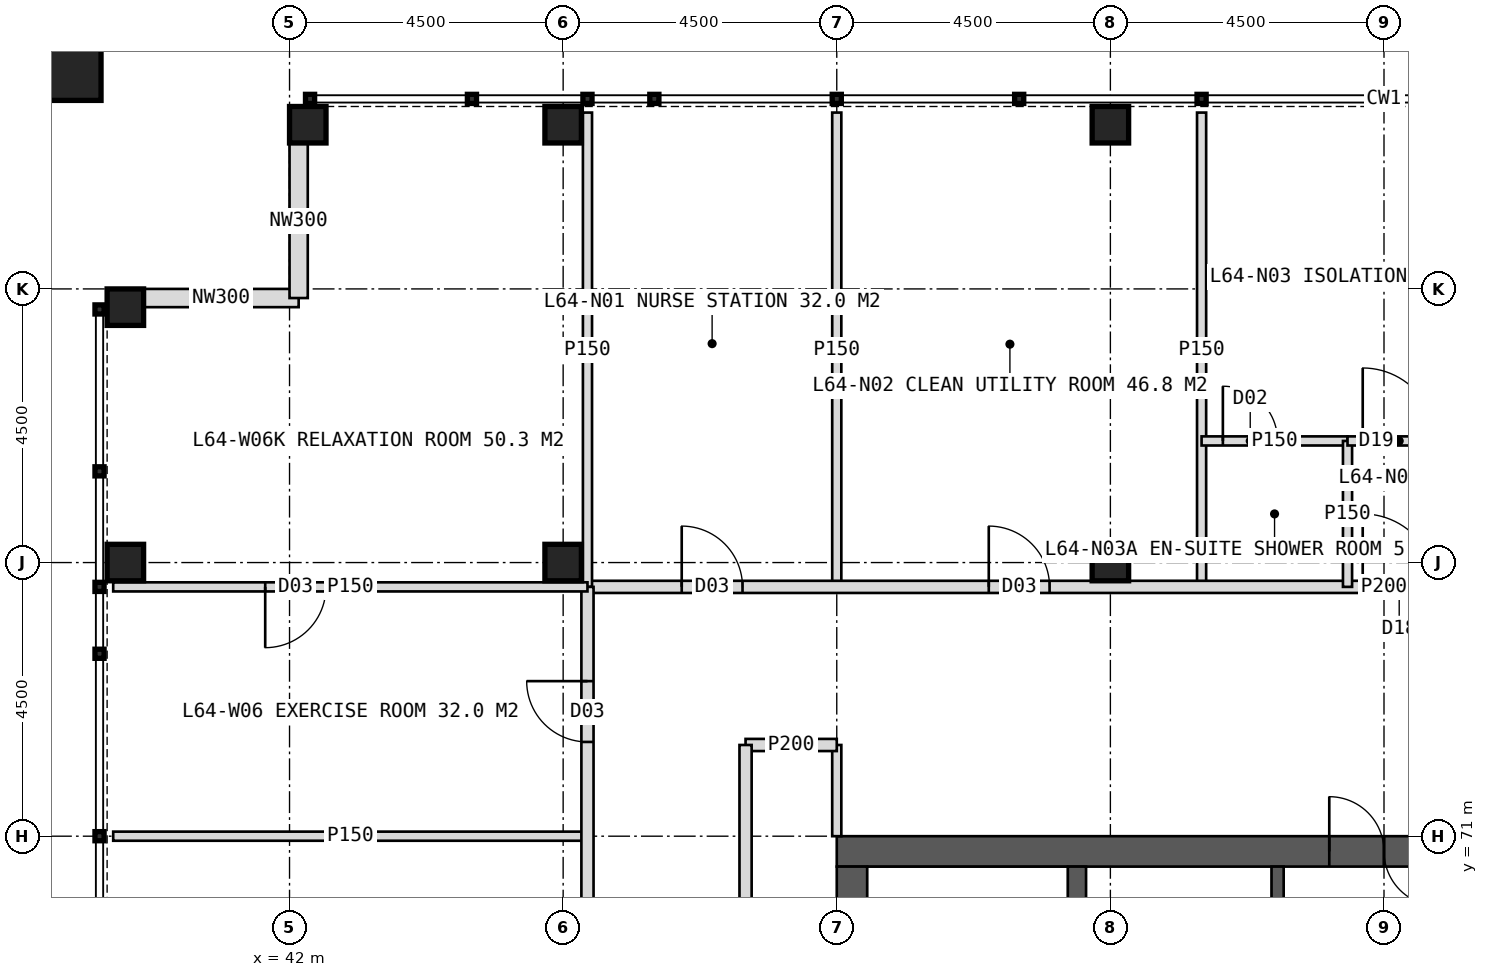
"""IFC4 building model, lengths in metres.
Left out: names, types, materials, properties, quantities, classifications, styles, units other than length and angle.
Written with IfcOpenShell. Run it as: python <this file> out.ifc"""

import sys

from ifc_helpers import new_model, si_unit, direction, frame, frame_2d, origin, origin_2d, place, context, subcontext, project, spatial, rectangle, hollow_rectangle, extrude, element, fill, save


model = new_model("IFC4")
c1 = context("Model", 3, precision=1e-05, world=origin(), true_north=direction((0.0, 1.0)))
c2 = subcontext(c1, "Body", "Model", "MODEL_VIEW")
j1 = project(units=[si_unit("LENGTHUNIT", "METRE"), si_unit("PLANEANGLEUNIT", "RADIAN")], contexts=[c1])
p1 = place(None, origin())
s1 = spatial("IfcSite", under=j1, at=p1, CompositionType="ELEMENT")
p2 = place(p1, origin())
s2 = spatial("IfcBuilding", under=s1, at=p2, CompositionType="ELEMENT")
p3 = place(p2, frame((0.0, 0.0, 266.0)))
s3 = spatial("IfcBuildingStorey", under=s2, at=p3, CompositionType="ELEMENT", Elevation=266.0)
p4 = place(p3, frame((51.0, 70.75, 0.0), z_axis=(0.0, 0.0, 1.0), x_axis=(1.0, 0.0, 0.0)))
e1 = element("IfcWall", 1, at=p4, inside=s3, PredefinedType="SHEAR", context=c2, shape_type="SweptSolid", body=[
    extrude(rectangle(XDim=18.0, YDim=0.5, at=frame_2d((9.0, 0.0))), origin(), (0.0, 0.0, 1.0), 4.0),
])
p5 = place(p4, frame((8.1, 0.0, 0.0)))
e2 = element("IfcOpeningElement", 2, at=p5, cuts=e1, PredefinedType="OPENING", context=c2, shape_type="SweptSolid", body=[
    extrude(rectangle(XDim=1.8, YDim=2.2, at=frame_2d((0.9, 1.1))), frame((0.0, 0.26, 0.0), z_axis=(0.0, -1.0, 0.0), x_axis=(1.0, 0.0, 0.0)), (0.0, 0.0, 1.0), 0.52),
])
p6 = place(p3, frame((51.25, 53.5, 0.0), z_axis=(0.0, 0.0, 1.0), x_axis=(0.0, 1.0, 0.0)))
e3 = element("IfcWall", 3, at=p6, inside=s3, PredefinedType="SHEAR", context=c2, shape_type="SweptSolid", body=[
    extrude(rectangle(XDim=17.0, YDim=0.5, at=frame_2d((8.5, 0.0))), origin(), (0.0, 0.0, 1.0), 4.0),
])
p7 = place(p6, frame((6.1, 0.0, 0.0)))
e4 = element("IfcOpeningElement", 4, at=p7, cuts=e3, PredefinedType="OPENING", context=c2, shape_type="SweptSolid", body=[
    extrude(rectangle(XDim=1.5, YDim=2.2, at=frame_2d((0.75, 1.1))), frame((0.0, 0.26, 0.0), z_axis=(0.0, -1.0, 0.0), x_axis=(1.0, 0.0, 0.0)), (0.0, 0.0, 1.0), 0.52),
])
p8 = place(p3, frame((54.95, 53.5, 0.0), z_axis=(0.0, 0.0, 1.0), x_axis=(0.0, 1.0, 0.0)))
e5 = element("IfcWall", 5, at=p8, inside=s3, PredefinedType="SHEAR", context=c2, shape_type="SweptSolid", body=[
    extrude(rectangle(XDim=17.0, YDim=0.3, at=frame_2d((8.5, 0.0))), origin(), (0.0, 0.0, 1.0), 4.0),
])
p9 = place(p3, frame((58.25, 53.5, 0.0), z_axis=(0.0, 0.0, 1.0), x_axis=(0.0, 1.0, 0.0)))
e6 = element("IfcWall", 6, at=p9, inside=s3, PredefinedType="SHEAR", context=c2, shape_type="SweptSolid", body=[
    extrude(rectangle(XDim=17.0, YDim=0.2, at=frame_2d((8.5, 0.0))), origin(), (0.0, 0.0, 1.0), 4.0),
])
p10 = place(p9, frame((0.393, 0.0, 0.0)))
e7 = element("IfcOpeningElement", 7, at=p10, cuts=e6, PredefinedType="OPENING", context=c2, shape_type="SweptSolid", body=[
    extrude(rectangle(XDim=1.0, YDim=2.1, at=frame_2d((0.5, 1.05))), frame((0.0, 0.11, 0.0), z_axis=(0.0, -1.0, 0.0), x_axis=(1.0, 0.0, 0.0)), (0.0, 0.0, 1.0), 0.22),
])
p11 = place(p9, frame((2.542, 0.0, 0.0)))
e8 = element("IfcOpeningElement", 8, at=p11, cuts=e6, PredefinedType="OPENING", context=c2, shape_type="SweptSolid", body=[
    extrude(rectangle(XDim=1.0, YDim=2.1, at=frame_2d((0.5, 1.05))), frame((0.0, 0.11, 0.0), z_axis=(0.0, -1.0, 0.0), x_axis=(1.0, 0.0, 0.0)), (0.0, 0.0, 1.0), 0.22),
])
p12 = place(p9, frame((5.127, 0.0, 0.0)))
e9 = element("IfcOpeningElement", 9, at=p12, cuts=e6, PredefinedType="OPENING", context=c2, shape_type="SweptSolid", body=[
    extrude(rectangle(XDim=1.0, YDim=2.1, at=frame_2d((0.5, 1.05))), frame((0.0, 0.11, 0.0), z_axis=(0.0, -1.0, 0.0), x_axis=(1.0, 0.0, 0.0)), (0.0, 0.0, 1.0), 0.22),
])
p13 = place(p9, frame((7.228, 0.0, 0.0)))
e10 = element("IfcOpeningElement", 10, at=p13, cuts=e6, PredefinedType="OPENING", context=c2, shape_type="SweptSolid", body=[
    extrude(rectangle(XDim=1.0, YDim=2.1, at=frame_2d((0.5, 1.05))), frame((0.0, 0.11, 0.0), z_axis=(0.0, -1.0, 0.0), x_axis=(1.0, 0.0, 0.0)), (0.0, 0.0, 1.0), 0.22),
])
p14 = place(p9, frame((10.025, 0.0, 0.0)))
e11 = element("IfcOpeningElement", 11, at=p14, cuts=e6, PredefinedType="OPENING", context=c2, shape_type="SweptSolid", body=[
    extrude(rectangle(XDim=1.4, YDim=2.2, at=frame_2d((0.7, 1.1))), frame((0.0, 0.11, 0.0), z_axis=(0.0, -1.0, 0.0), x_axis=(1.0, 0.0, 0.0)), (0.0, 0.0, 1.0), 0.22),
])
p15 = place(p9, frame((14.325, 0.0, 0.0)))
e12 = element("IfcOpeningElement", 12, at=p15, cuts=e6, PredefinedType="OPENING", context=c2, shape_type="SweptSolid", body=[
    extrude(rectangle(XDim=1.4, YDim=2.2, at=frame_2d((0.7, 1.1))), frame((0.0, 0.11, 0.0), z_axis=(0.0, -1.0, 0.0), x_axis=(1.0, 0.0, 0.0)), (0.0, 0.0, 1.0), 0.22),
])
for number, where, z_axis, x_axis in (
    (13, (46.5, 75.5, 0.0), (0.0, 0.0, 1.0), (1.0, 0.0, 0.0)),
    (14, (55.5, 75.5, 0.0), (0.0, 0.0, 1.0), (1.0, 0.0, 0.0)),
    (15, (42.3, 82.7, 0.0), (0.0, 0.0, 1.0), (1.0, 0.0, 0.0)),
    (16, (46.5, 82.7, 0.0), (0.0, 0.0, 1.0), (1.0, 0.0, 0.0)),
    (17, (55.5, 82.7, 0.0), (0.0, 0.0, 1.0), (1.0, 0.0, 0.0)),
    (18, (39.3, 75.5, 0.0), (0.0, 0.0, 1.0), (1.0, 0.0, 0.0)),
    (19, (39.3, 79.7, 0.0), (0.0, 0.0, 1.0), (1.0, 0.0, 0.0)),
):
    element("IfcColumn", number, at=place(p3, frame(where, z_axis=z_axis, x_axis=x_axis)), inside=s3, PredefinedType="COLUMN", context=c2, shape_type="SweptSolid", body=[
        extrude(hollow_rectangle(XDim=0.6, YDim=0.6, WallThickness=0.04, at=origin_2d()), origin(), (0.0, 0.0, 1.0), 4.0),
    ])
p16 = place(p3, frame((38.4, 83.6, 0.0), z_axis=(0.0, 0.0, 1.0), x_axis=(1.0, 0.0, 0.0)))
e20 = element("IfcColumn", 20, at=p16, inside=s3, PredefinedType="COLUMN", context=c2, shape_type="SweptSolid", body=[
    extrude(hollow_rectangle(XDim=1.0, YDim=1.0, WallThickness=0.06, at=origin_2d()), origin(), (0.0, 0.0, 1.0), 4.0),
])
for number, where, z_axis, x_axis in (
    (21, (39.6, 79.85, 0.0), (0.0, 0.0, 1.0), (1.0, 0.0, 0.0)),
    (22, (42.15, 79.85, 0.0), (0.0, 0.0, 1.0), (0.0, 1.0, 0.0)),
):
    element("IfcWall", number, at=place(p3, frame(where, z_axis=z_axis, x_axis=x_axis)), inside=s3, PredefinedType="ELEMENTEDWALL", context=c2, shape_type="SweptSolid", body=[
        extrude(rectangle(XDim=2.55, YDim=0.3, at=frame_2d((1.275, 0.0))), origin(), (0.0, 0.0, 1.0), 2.95),
    ])
for number, where, z_axis, x_axis in (
    (23, (51.0, 75.1, 0.0), (0.0, 0.0, 1.0), (0.0, 1.0, 0.0)),
    (24, (57.0, 75.1, 0.0), (0.0, 0.0, 1.0), (0.0, 1.0, 0.0)),
):
    element("IfcWall", number, at=place(p3, frame(where, z_axis=z_axis, x_axis=x_axis)), inside=s3, PredefinedType="PARTITIONING", context=c2, shape_type="SweptSolid", body=[
        extrude(rectangle(XDim=7.8, YDim=0.15, at=frame_2d((3.9, 0.0))), origin(), (0.0, 0.0, 1.0), 3.75),
    ])
p17 = place(p3, frame((46.9, 75.1, 0.0), z_axis=(0.0, 0.0, 1.0), x_axis=(1.0, 0.0, 0.0)))
e25 = element("IfcWall", 25, at=p17, inside=s3, PredefinedType="PARTITIONING", context=c2, shape_type="SweptSolid", body=[
    extrude(rectangle(XDim=26.2, YDim=0.2, at=frame_2d((13.1, 0.0))), origin(), (0.0, 0.0, 1.0), 3.75),
])
p18 = place(p17, frame((1.55, 0.0, 0.0)))
e26 = element("IfcOpeningElement", 26, at=p18, cuts=e25, PredefinedType="OPENING", context=c2, shape_type="SweptSolid", body=[
    extrude(rectangle(XDim=1.0, YDim=2.1, at=frame_2d((0.5, 1.05))), frame((0.0, 0.11, 0.0), z_axis=(0.0, -1.0, 0.0), x_axis=(1.0, 0.0, 0.0)), (0.0, 0.0, 1.0), 0.22),
])
p19 = place(p17, frame((6.6, 0.0, 0.0)))
e27 = element("IfcOpeningElement", 27, at=p19, cuts=e25, PredefinedType="OPENING", context=c2, shape_type="SweptSolid", body=[
    extrude(rectangle(XDim=1.0, YDim=2.1, at=frame_2d((0.5, 1.05))), frame((0.0, 0.11, 0.0), z_axis=(0.0, -1.0, 0.0), x_axis=(1.0, 0.0, 0.0)), (0.0, 0.0, 1.0), 0.22),
])
p20 = place(p17, frame((12.75, 0.0, 0.0)))
e28 = element("IfcOpeningElement", 28, at=p20, cuts=e25, PredefinedType="OPENING", context=c2, shape_type="SweptSolid", body=[
    extrude(rectangle(XDim=1.2, YDim=2.2, at=frame_2d((0.6, 1.1))), frame((0.0, 0.11, 0.0), z_axis=(0.0, -1.0, 0.0), x_axis=(1.0, 0.0, 0.0)), (0.0, 0.0, 1.0), 0.22),
])
p21 = place(p17, frame((18.45, 0.0, 0.0)))
e29 = element("IfcOpeningElement", 29, at=p21, cuts=e25, PredefinedType="OPENING", context=c2, shape_type="SweptSolid", body=[
    extrude(rectangle(XDim=1.0, YDim=2.1, at=frame_2d((0.5, 1.05))), frame((0.0, 0.11, 0.0), z_axis=(0.0, -1.0, 0.0), x_axis=(1.0, 0.0, 0.0)), (0.0, 0.0, 1.0), 0.22),
])
p22 = place(p17, frame((22.9, 0.0, 0.0)))
e30 = element("IfcOpeningElement", 30, at=p22, cuts=e25, PredefinedType="OPENING", context=c2, shape_type="SweptSolid", body=[
    extrude(rectangle(XDim=1.0, YDim=2.1, at=frame_2d((0.5, 1.05))), frame((0.0, 0.11, 0.0), z_axis=(0.0, -1.0, 0.0), x_axis=(1.0, 0.0, 0.0)), (0.0, 0.0, 1.0), 0.22),
])
p23 = place(p3, frame((46.9, 75.1, 0.0), z_axis=(0.0, 0.0, 1.0), x_axis=(0.0, 1.0, 0.0)))
e31 = element("IfcWall", 31, at=p23, inside=s3, PredefinedType="PARTITIONING", context=c2, shape_type="SweptSolid", body=[
    extrude(rectangle(XDim=7.8, YDim=0.15, at=frame_2d((3.9, 0.0))), origin(), (0.0, 0.0, 1.0), 3.75),
])
p24 = place(p3, frame((57.0, 77.5, 0.0), z_axis=(0.0, 0.0, 1.0), x_axis=(1.0, 0.0, 0.0)))
e32 = element("IfcWall", 32, at=p24, inside=s3, PredefinedType="PARTITIONING", context=c2, shape_type="SweptSolid", body=[
    extrude(rectangle(XDim=2.4, YDim=0.15, at=frame_2d((1.2, 0.0))), origin(), (0.0, 0.0, 1.0), 3.75),
])
p25 = place(p24, frame((0.35, 0.0, 0.0)))
e33 = element("IfcOpeningElement", 33, at=p25, cuts=e32, PredefinedType="OPENING", context=c2, shape_type="SweptSolid", body=[
    extrude(rectangle(XDim=0.9, YDim=2.1, at=frame_2d((0.45, 1.05))), frame((0.0, 0.085, 0.0), z_axis=(0.0, -1.0, 0.0), x_axis=(1.0, 0.0, 0.0)), (0.0, 0.0, 1.0), 0.17),
])
p26 = place(p3, frame((59.4, 75.1, 0.0), z_axis=(0.0, 0.0, 1.0), x_axis=(0.0, 1.0, 0.0)))
e34 = element("IfcWall", 34, at=p26, inside=s3, PredefinedType="PARTITIONING", context=c2, shape_type="SweptSolid", body=[
    extrude(rectangle(XDim=2.4, YDim=0.15, at=frame_2d((1.2, 0.0))), origin(), (0.0, 0.0, 1.0), 3.75),
])
p27 = place(p3, frame((59.4, 77.5, 0.0), z_axis=(0.0, 0.0, 1.0), x_axis=(1.0, 0.0, 0.0)))
e35 = element("IfcWall", 35, at=p27, inside=s3, PredefinedType="PARTITIONING", context=c2, shape_type="SweptSolid", body=[
    extrude(rectangle(XDim=3.6, YDim=0.15, at=frame_2d((1.8, 0.0))), origin(), (0.0, 0.0, 1.0), 3.75),
])
p28 = place(p27, frame((0.25, 0.0, 0.0)))
e36 = element("IfcOpeningElement", 36, at=p28, cuts=e35, PredefinedType="OPENING", context=c2, shape_type="SweptSolid", body=[
    extrude(rectangle(XDim=1.2, YDim=2.2, at=frame_2d((0.6, 1.1))), frame((0.0, 0.085, 0.0), z_axis=(0.0, -1.0, 0.0), x_axis=(1.0, 0.0, 0.0)), (0.0, 0.0, 1.0), 0.17),
])
p29 = place(p3, frame((51.0, 71.0, 0.0), z_axis=(0.0, 0.0, 1.0), x_axis=(0.0, 1.0, 0.0)))
e37 = element("IfcWall", 37, at=p29, inside=s3, PredefinedType="PARTITIONING", context=c2, shape_type="SweptSolid", body=[
    extrude(rectangle(XDim=1.5, YDim=0.15, at=frame_2d((0.75, 0.0))), origin(), (0.0, 0.0, 1.0), 3.75),
])
p30 = place(p3, frame((49.5, 72.5, 0.0), z_axis=(0.0, 0.0, 1.0), x_axis=(1.0, 0.0, 0.0)))
e38 = element("IfcWall", 38, at=p30, inside=s3, PredefinedType="PARTITIONING", context=c2, shape_type="SweptSolid", body=[
    extrude(rectangle(XDim=1.5, YDim=0.2, at=frame_2d((0.75, 0.0))), origin(), (0.0, 0.0, 1.0), 3.75),
])
p31 = place(p3, frame((46.9, 71.0, 0.0), z_axis=(0.0, 0.0, 1.0), x_axis=(-1.0, 0.0, 0.0)))
e39 = element("IfcWall", 39, at=p31, inside=s3, PredefinedType="PARTITIONING", context=c2, shape_type="SweptSolid", body=[
    extrude(rectangle(XDim=7.8, YDim=0.15, at=frame_2d((3.9, 0.0))), origin(), (0.0, 0.0, 1.0), 3.75),
])
p32 = place(p3, frame((46.9, 48.9, 0.0), z_axis=(0.0, 0.0, 1.0), x_axis=(0.0, 1.0, 0.0)))
e40 = element("IfcWall", 40, at=p32, inside=s3, PredefinedType="PARTITIONING", context=c2, shape_type="SweptSolid", body=[
    extrude(rectangle(XDim=26.2, YDim=0.2, at=frame_2d((13.1, 0.0))), origin(), (0.0, 0.0, 1.0), 3.75),
])
p33 = place(p32, frame((1.75, 0.0, 0.0)))
e41 = element("IfcOpeningElement", 41, at=p33, cuts=e40, PredefinedType="OPENING", context=c2, shape_type="SweptSolid", body=[
    extrude(rectangle(XDim=1.2, YDim=2.2, at=frame_2d((0.6, 1.1))), frame((0.0, 0.11, 0.0), z_axis=(0.0, -1.0, 0.0), x_axis=(1.0, 0.0, 0.0)), (0.0, 0.0, 1.0), 0.22),
])
p34 = place(p32, frame((6.75, 0.0, 0.0)))
e42 = element("IfcOpeningElement", 42, at=p34, cuts=e40, PredefinedType="OPENING", context=c2, shape_type="SweptSolid", body=[
    extrude(rectangle(XDim=1.0, YDim=2.1, at=frame_2d((0.5, 1.05))), frame((0.0, 0.11, 0.0), z_axis=(0.0, -1.0, 0.0), x_axis=(1.0, 0.0, 0.0)), (0.0, 0.0, 1.0), 0.22),
])
p35 = place(p32, frame((11.1, 0.0, 0.0)))
e43 = element("IfcOpeningElement", 43, at=p35, cuts=e40, PredefinedType="OPENING", context=c2, shape_type="SweptSolid", body=[
    extrude(rectangle(XDim=1.0, YDim=2.1, at=frame_2d((0.5, 1.05))), frame((0.0, 0.11, 0.0), z_axis=(0.0, -1.0, 0.0), x_axis=(1.0, 0.0, 0.0)), (0.0, 0.0, 1.0), 0.22),
])
p36 = place(p32, frame((14.1, 0.0, 0.0)))
e44 = element("IfcOpeningElement", 44, at=p36, cuts=e40, PredefinedType="OPENING", context=c2, shape_type="SweptSolid", body=[
    extrude(rectangle(XDim=1.0, YDim=2.1, at=frame_2d((0.5, 1.05))), frame((0.0, 0.11, 0.0), z_axis=(0.0, -1.0, 0.0), x_axis=(1.0, 0.0, 0.0)), (0.0, 0.0, 1.0), 0.22),
])
p37 = place(p32, frame((18.6, 0.0, 0.0)))
e45 = element("IfcOpeningElement", 45, at=p37, cuts=e40, PredefinedType="OPENING", context=c2, shape_type="SweptSolid", body=[
    extrude(rectangle(XDim=1.0, YDim=2.1, at=frame_2d((0.5, 1.05))), frame((0.0, 0.11, 0.0), z_axis=(0.0, -1.0, 0.0), x_axis=(1.0, 0.0, 0.0)), (0.0, 0.0, 1.0), 0.22),
])
p38 = place(p32, frame((23.65, 0.0, 0.0)))
e46 = element("IfcOpeningElement", 46, at=p38, cuts=e40, PredefinedType="OPENING", context=c2, shape_type="SweptSolid", body=[
    extrude(rectangle(XDim=1.0, YDim=2.1, at=frame_2d((0.5, 1.05))), frame((0.0, 0.11, 0.0), z_axis=(0.0, -1.0, 0.0), x_axis=(1.0, 0.0, 0.0)), (0.0, 0.0, 1.0), 0.22),
])
p39 = place(p3, frame((46.9, 75.1, 0.0), z_axis=(0.0, 0.0, 1.0), x_axis=(-1.0, 0.0, 0.0)))
e47 = element("IfcWall", 47, at=p39, inside=s3, PredefinedType="PARTITIONING", context=c2, shape_type="SweptSolid", body=[
    extrude(rectangle(XDim=7.8, YDim=0.15, at=frame_2d((3.9, 0.0))), origin(), (0.0, 0.0, 1.0), 3.75),
])
p40 = place(p39, frame((4.3, 0.0, 0.0)))
e48 = element("IfcOpeningElement", 48, at=p40, cuts=e47, PredefinedType="OPENING", context=c2, shape_type="SweptSolid", body=[
    extrude(rectangle(XDim=1.0, YDim=2.1, at=frame_2d((0.5, 1.05))), frame((0.0, 0.085, 0.0), z_axis=(0.0, -1.0, 0.0), x_axis=(1.0, 0.0, 0.0)), (0.0, 0.0, 1.0), 0.17),
])
p41 = place(p3, frame((49.5, 62.0, 0.0), z_axis=(0.0, 0.0, 1.0), x_axis=(0.0, 1.0, 0.0)))
e49 = element("IfcWall", 49, at=p41, inside=s3, PredefinedType="PARTITIONING", context=c2, shape_type="SweptSolid", body=[
    extrude(rectangle(XDim=10.5, YDim=0.2, at=frame_2d((5.25, 0.0))), origin(), (0.0, 0.0, 1.0), 3.75),
])
p42 = place(p41, frame((0.75, 0.0, 0.0)))
e50 = element("IfcOpeningElement", 50, at=p42, cuts=e49, PredefinedType="OPENING", context=c2, shape_type="SweptSolid", body=[
    extrude(rectangle(XDim=0.9, YDim=2.1, at=frame_2d((0.45, 1.05))), frame((0.0, 0.11, 0.0), z_axis=(0.0, -1.0, 0.0), x_axis=(1.0, 0.0, 0.0)), (0.0, 0.0, 1.0), 0.22),
])
p43 = place(p41, frame((5.95, 0.0, 0.0)))
e51 = element("IfcOpeningElement", 51, at=p43, cuts=e49, PredefinedType="OPENING", context=c2, shape_type="SweptSolid", body=[
    extrude(rectangle(XDim=1.0, YDim=2.1, at=frame_2d((0.5, 1.05))), frame((0.0, 0.11, 0.0), z_axis=(0.0, -1.0, 0.0), x_axis=(1.0, 0.0, 0.0)), (0.0, 0.0, 1.0), 0.22),
])
p44 = place(p18, origin())
e52 = element("IfcDoor", 52, at=p44, inside=s3, OperationType="SINGLE_SWING_LEFT", PredefinedType="DOOR", context=c2, shape_type="SweptSolid", body=[
    extrude(rectangle(XDim=1.0, YDim=2.1, at=frame_2d((0.5, 1.05))), frame((0.0, 0.025, 0.0), z_axis=(0.0, -1.0, 0.0), x_axis=(1.0, 0.0, 0.0)), (0.0, 0.0, 1.0), 0.05),
])
fill(e26, e52)
p45 = place(p19, origin())
e53 = element("IfcDoor", 53, at=p45, inside=s3, OperationType="SINGLE_SWING_LEFT", PredefinedType="DOOR", context=c2, shape_type="SweptSolid", body=[
    extrude(rectangle(XDim=1.0, YDim=2.1, at=frame_2d((0.5, 1.05))), frame((0.0, 0.025, 0.0), z_axis=(0.0, -1.0, 0.0), x_axis=(1.0, 0.0, 0.0)), (0.0, 0.0, 1.0), 0.05),
])
fill(e27, e53)
p46 = place(p28, origin())
e54 = element("IfcDoor", 54, at=p46, inside=s3, OperationType="SINGLE_SWING_LEFT", PredefinedType="DOOR", context=c2, shape_type="SweptSolid", body=[
    extrude(rectangle(XDim=1.2, YDim=2.2, at=frame_2d((0.6, 1.1))), frame((0.0, 0.025, 0.0), z_axis=(0.0, -1.0, 0.0), x_axis=(1.0, 0.0, 0.0)), (0.0, 0.0, 1.0), 0.05),
])
fill(e36, e54)
p47 = place(p20, origin())
e55 = element("IfcDoor", 55, at=p47, inside=s3, OperationType="SINGLE_SWING_LEFT", PredefinedType="DOOR", context=c2, shape_type="SweptSolid", body=[
    extrude(rectangle(XDim=1.2, YDim=2.2, at=frame_2d((0.6, 1.1))), frame((0.0, 0.025, 0.0), z_axis=(0.0, -1.0, 0.0), x_axis=(1.0, 0.0, 0.0)), (0.0, 0.0, 1.0), 0.05),
])
fill(e28, e55)
p48 = place(p25, origin())
e56 = element("IfcDoor", 56, at=p48, inside=s3, OperationType="SINGLE_SWING_LEFT", PredefinedType="DOOR", context=c2, shape_type="SweptSolid", body=[
    extrude(rectangle(XDim=0.9, YDim=2.1, at=frame_2d((0.45, 1.05))), frame((0.0, 0.025, 0.0), z_axis=(0.0, -1.0, 0.0), x_axis=(1.0, 0.0, 0.0)), (0.0, 0.0, 1.0), 0.05),
])
fill(e33, e56)
p49 = place(p40, origin())
e57 = element("IfcDoor", 57, at=p49, inside=s3, OperationType="SINGLE_SWING_RIGHT", PredefinedType="DOOR", context=c2, shape_type="SweptSolid", body=[
    extrude(rectangle(XDim=1.0, YDim=2.1, at=frame_2d((0.5, 1.05))), frame((0.0, 0.025, 0.0), z_axis=(0.0, -1.0, 0.0), x_axis=(1.0, 0.0, 0.0)), (0.0, 0.0, 1.0), 0.05),
])
fill(e48, e57)
p50 = place(p38, origin())
e58 = element("IfcDoor", 58, at=p50, inside=s3, OperationType="SINGLE_SWING_RIGHT", PredefinedType="DOOR", context=c2, shape_type="SweptSolid", body=[
    extrude(rectangle(XDim=1.0, YDim=2.1, at=frame_2d((0.5, 1.05))), frame((0.0, 0.025, 0.0), z_axis=(0.0, -1.0, 0.0), x_axis=(1.0, 0.0, 0.0)), (0.0, 0.0, 1.0), 0.05),
])
fill(e46, e58)
p51 = place(p5, origin())
e59 = element("IfcDoor", 59, at=p51, inside=s3, OperationType="DOUBLE_DOOR_SINGLE_SWING", PredefinedType="DOOR", context=c2, shape_type="SweptSolid", body=[
    extrude(rectangle(XDim=1.8, YDim=2.2, at=frame_2d((0.9, 1.1))), frame((0.0, 0.025, 0.0), z_axis=(0.0, -1.0, 0.0), x_axis=(1.0, 0.0, 0.0)), (0.0, 0.0, 1.0), 0.05),
])
fill(e2, e59)
save(model, sys.argv[1])
